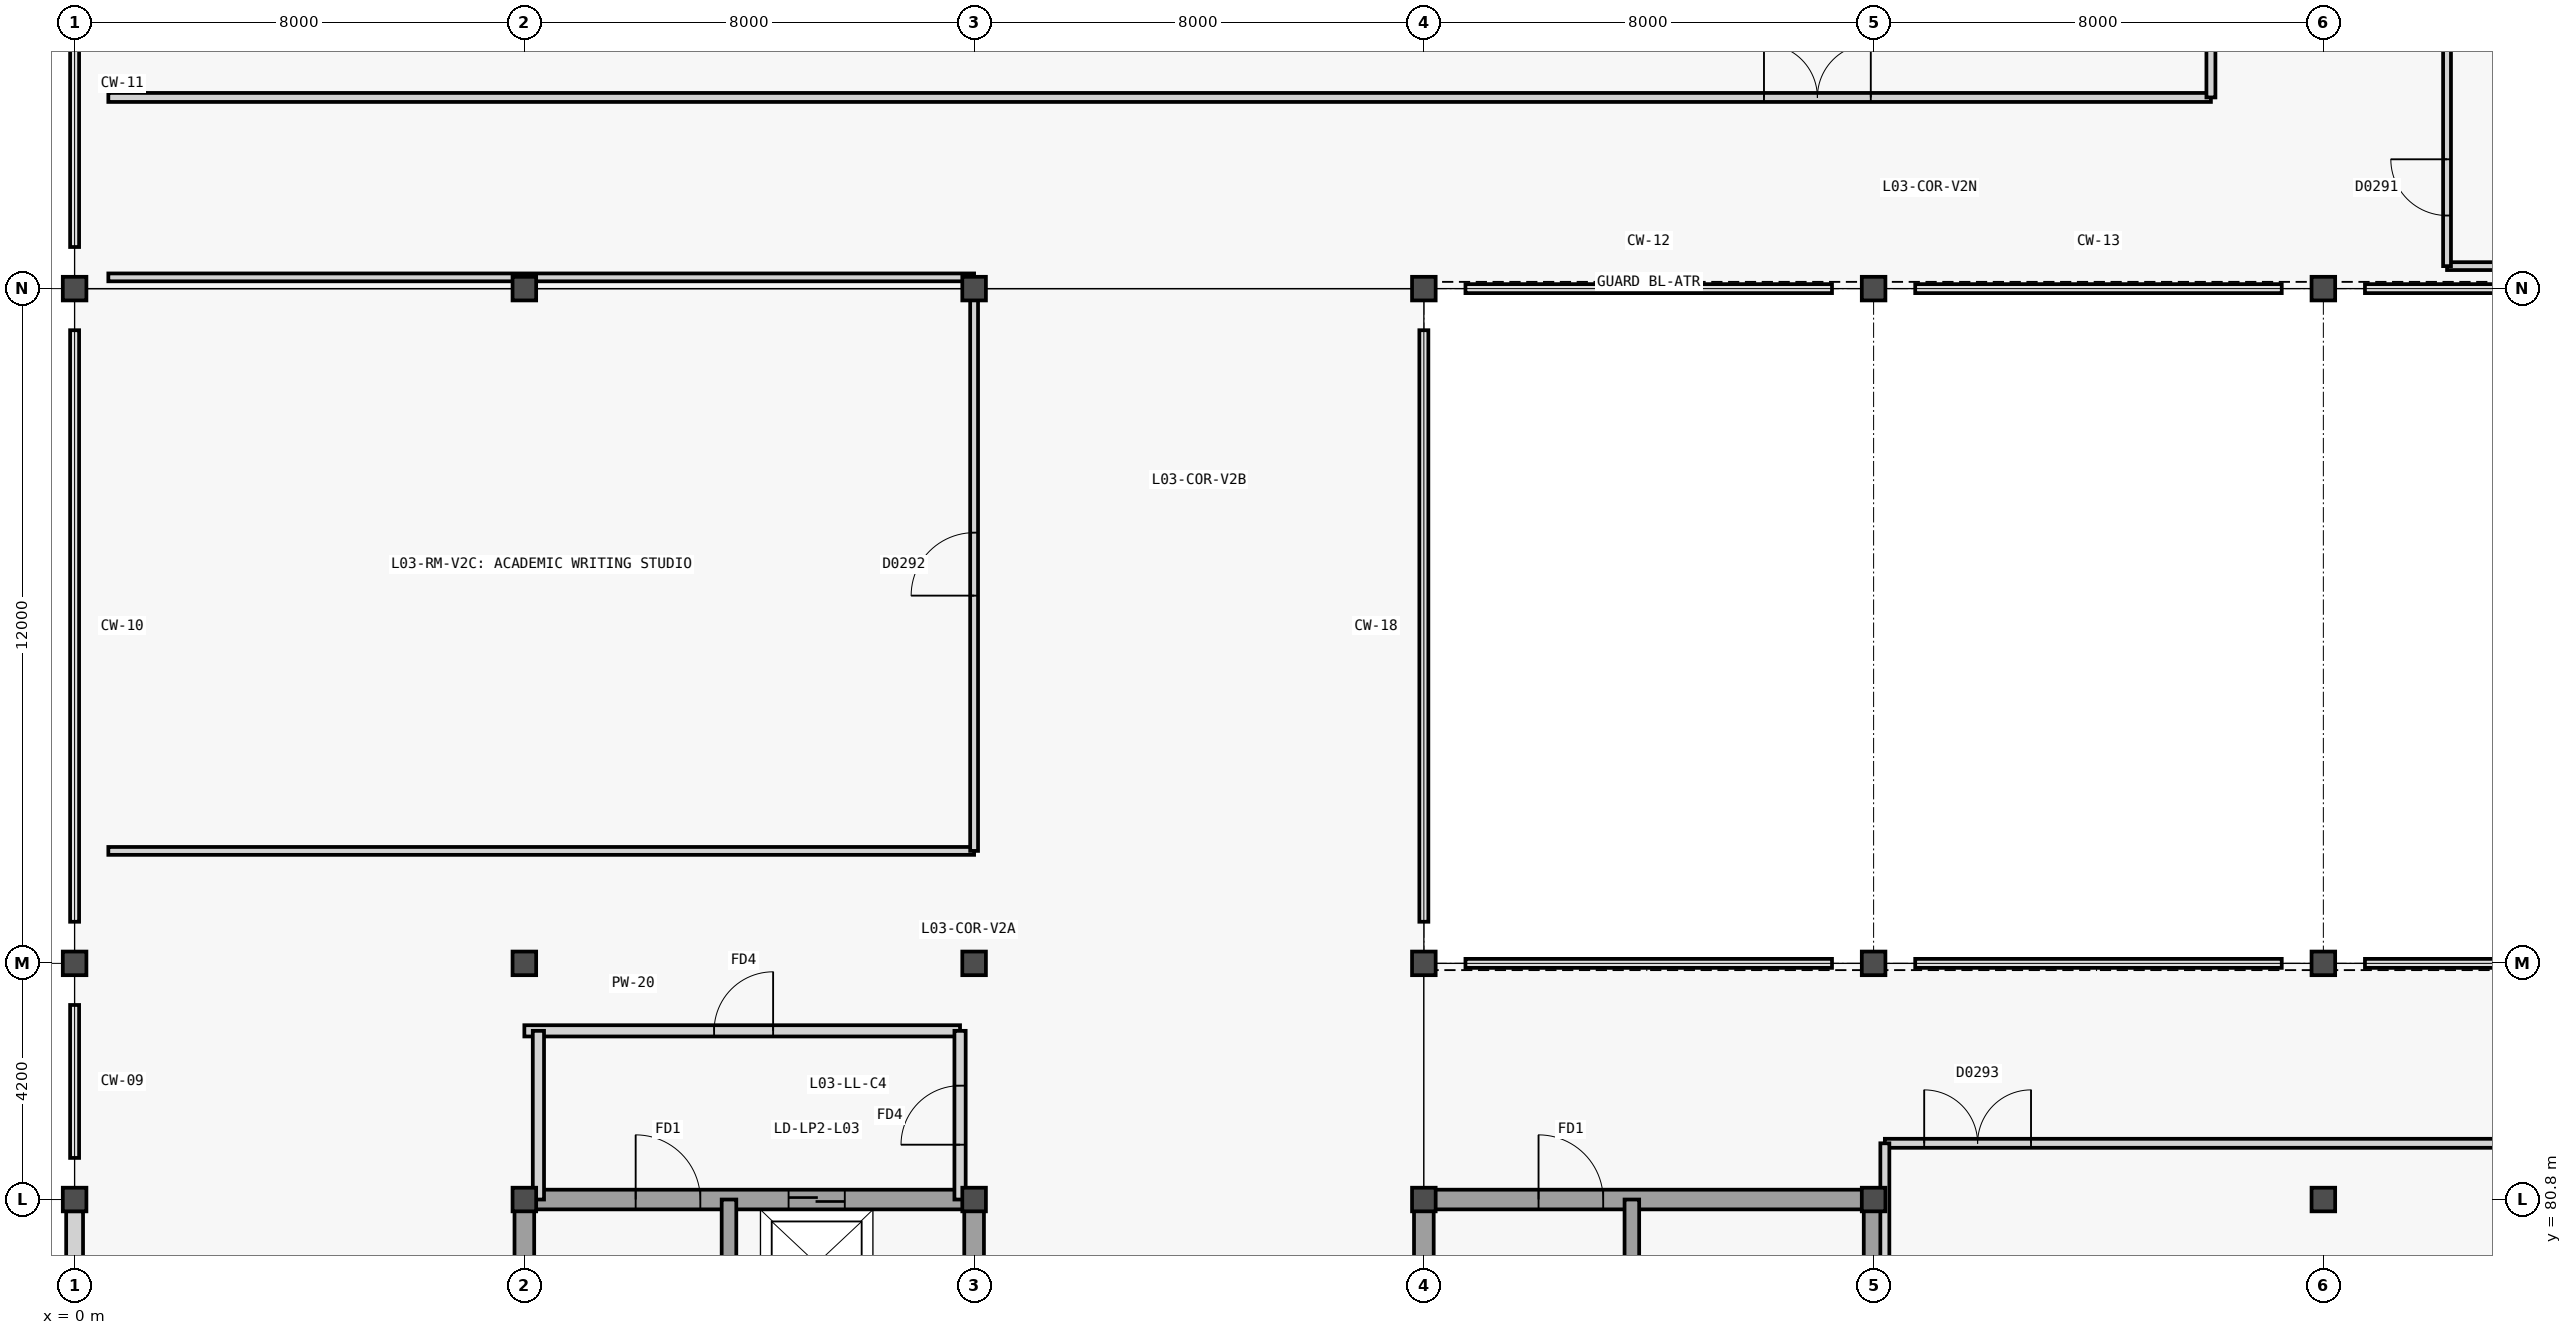
"""IFC4 building model, lengths in metres.
Left out: names, types, materials, properties, quantities, classifications, styles, units other than length and angle.
Written with IfcOpenShell. Run it as: python <this file> out.ifc"""

import sys

from ifc_helpers import new_model, si_unit, direction, frame, frame_2d, origin, origin_2d, place, context, subcontext, project, spatial, rectangle, extrude, element, fill, save


model = new_model("IFC4")
c1 = context("Model", 3, precision=1e-05, world=origin(), true_north=direction((0.0, 1.0)))
c2 = subcontext(c1, "Body", "Model", "MODEL_VIEW")
j1 = project(units=[si_unit("LENGTHUNIT", "METRE"), si_unit("PLANEANGLEUNIT", "RADIAN")], contexts=[c1])
p1 = place(None, origin())
s1 = spatial("IfcSite", under=j1, at=p1, CompositionType="ELEMENT")
p2 = place(p1, origin())
s2 = spatial("IfcBuilding", under=s1, at=p2, CompositionType="ELEMENT")
p3 = place(p2, frame((0.0, 0.0, 14.4)))
s3 = spatial("IfcBuildingStorey", under=s2, at=p3, CompositionType="ELEMENT", Elevation=14.4)
for number, where, z_axis, x_axis in (
    (1, (0.0, 80.8, 0.0), (0.0, 0.0, 1.0), (1.0, 0.0, 0.0)),
    (2, (0.0, 85.0, 0.0), (0.0, 0.0, 1.0), (1.0, 0.0, 0.0)),
    (3, (0.0, 97.0, 0.0), (0.0, 0.0, 1.0), (1.0, 0.0, 0.0)),
    (4, (8.0, 80.8, 0.0), (0.0, 0.0, 1.0), (1.0, 0.0, 0.0)),
    (5, (8.0, 85.0, 0.0), (0.0, 0.0, 1.0), (1.0, 0.0, 0.0)),
    (6, (8.0, 97.0, 0.0), (0.0, 0.0, 1.0), (1.0, 0.0, 0.0)),
    (7, (16.0, 80.8, 0.0), (0.0, 0.0, 1.0), (1.0, 0.0, 0.0)),
    (8, (16.0, 85.0, 0.0), (0.0, 0.0, 1.0), (1.0, 0.0, 0.0)),
    (9, (16.0, 97.0, 0.0), (0.0, 0.0, 1.0), (1.0, 0.0, 0.0)),
    (10, (24.0, 80.8, 0.0), (0.0, 0.0, 1.0), (1.0, 0.0, 0.0)),
    (11, (24.0, 85.0, 0.0), (0.0, 0.0, 1.0), (1.0, 0.0, 0.0)),
    (12, (24.0, 97.0, 0.0), (0.0, 0.0, 1.0), (1.0, 0.0, 0.0)),
):
    element("IfcColumn", number, at=place(p3, frame(where, z_axis=z_axis, x_axis=x_axis)), inside=s3, PredefinedType="COLUMN", context=c2, shape_type="SweptSolid", body=[
        extrude(rectangle(XDim=0.42, YDim=0.42, at=origin_2d()), origin(), (0.0, 0.0, 1.0), 3.34),
    ])
for number, where, z_axis, x_axis in (
    (13, (32.0, 80.8, 0.0), (0.0, 0.0, 1.0), (1.0, 0.0, 0.0)),
    (14, (32.0, 85.0, 0.0), (0.0, 0.0, 1.0), (1.0, 0.0, 0.0)),
):
    element("IfcColumn", number, at=place(p3, frame(where, z_axis=z_axis, x_axis=x_axis)), inside=s3, PredefinedType="COLUMN", context=c2, shape_type="SweptSolid", body=[
        extrude(rectangle(XDim=0.42, YDim=0.42, at=origin_2d()), origin(), (0.0, 0.0, 1.0), 3.6),
    ])
p4 = place(p3, frame((32.0, 97.0, 0.0), z_axis=(0.0, 0.0, 1.0), x_axis=(1.0, 0.0, 0.0)))
e15 = element("IfcColumn", 15, at=p4, inside=s3, PredefinedType="COLUMN", context=c2, shape_type="SweptSolid", body=[
    extrude(rectangle(XDim=0.42, YDim=0.42, at=origin_2d()), origin(), (0.0, 0.0, 1.0), 3.34),
])
for number, where, z_axis, x_axis in (
    (16, (40.0, 80.8, 0.0), (0.0, 0.0, 1.0), (1.0, 0.0, 0.0)),
    (17, (40.0, 85.0, 0.0), (0.0, 0.0, 1.0), (1.0, 0.0, 0.0)),
):
    element("IfcColumn", number, at=place(p3, frame(where, z_axis=z_axis, x_axis=x_axis)), inside=s3, PredefinedType="COLUMN", context=c2, shape_type="SweptSolid", body=[
        extrude(rectangle(XDim=0.42, YDim=0.42, at=origin_2d()), origin(), (0.0, 0.0, 1.0), 3.6),
    ])
p5 = place(p3, frame((40.0, 97.0, 0.0), z_axis=(0.0, 0.0, 1.0), x_axis=(1.0, 0.0, 0.0)))
e18 = element("IfcColumn", 18, at=p5, inside=s3, PredefinedType="COLUMN", context=c2, shape_type="SweptSolid", body=[
    extrude(rectangle(XDim=0.42, YDim=0.42, at=origin_2d()), origin(), (0.0, 0.0, 1.0), 3.34),
])
p6 = place(p3, frame((0.0, 72.608, 0.0), z_axis=(0.0, 0.0, 1.0), x_axis=(0.0, 1.0, 0.0)))
e19 = element("IfcWall", 19, at=p6, inside=s3, PredefinedType="SOLIDWALL", context=c2, shape_type="SweptSolid", body=[
    extrude(rectangle(XDim=7.984, YDim=0.3, at=frame_2d((3.992, 0.0))), origin(), (0.0, 0.0, 1.0), 2.74),
])
p7 = place(p6, frame((1.972, 0.0, 0.9)))
e20 = element("IfcOpeningElement", 20, at=p7, cuts=e19, PredefinedType="OPENING", context=c2, shape_type="SweptSolid", body=[
    extrude(rectangle(XDim=1.8, YDim=1.55, at=frame_2d((0.9, 0.775))), frame((0.0, 0.16, 0.0), z_axis=(0.0, -1.0, 0.0), x_axis=(1.0, 0.0, 0.0)), (0.0, 0.0, 1.0), 0.32),
])
for number, where, z_axis, x_axis in (
    (21, (8.0, 72.4, 0.0), (0.0, 0.0, 1.0), (0.0, 1.0, 0.0)),
    (22, (16.0, 72.4, 0.0), (0.0, 0.0, 1.0), (0.0, 1.0, 0.0)),
):
    element("IfcWall", number, at=place(p3, frame(where, z_axis=z_axis, x_axis=x_axis)), inside=s3, PredefinedType="SHEAR", context=c2, shape_type="SweptSolid", body=[
        extrude(rectangle(XDim=8.4, YDim=0.35, at=frame_2d((4.2, 0.0))), origin(), (0.0, 0.0, 1.0), 3.6),
    ])
p8 = place(p3, frame((8.0, 80.8, 0.0), z_axis=(0.0, 0.0, 1.0), x_axis=(1.0, 0.0, 0.0)))
e23 = element("IfcWall", 23, at=p8, inside=s3, PredefinedType="SHEAR", context=c2, shape_type="SweptSolid", body=[
    extrude(rectangle(XDim=8.0, YDim=0.35, at=frame_2d((4.0, 0.0))), origin(), (0.0, 0.0, 1.0), 3.6),
])
p9 = place(p8, frame((1.98, 0.0, 0.0)))
e24 = element("IfcOpeningElement", 24, at=p9, cuts=e23, PredefinedType="OPENING", context=c2, shape_type="SweptSolid", body=[
    extrude(rectangle(XDim=1.15, YDim=2.2, at=frame_2d((0.575, 1.1))), frame((0.0, 0.185, 0.0), z_axis=(0.0, -1.0, 0.0), x_axis=(1.0, 0.0, 0.0)), (0.0, 0.0, 1.0), 0.37),
])
p10 = place(p8, frame((4.7, 0.0, 0.0)))
e25 = element("IfcOpeningElement", 25, at=p10, cuts=e23, PredefinedType="OPENING", context=c2, shape_type="SweptSolid", body=[
    extrude(rectangle(XDim=1.0, YDim=2.15, at=frame_2d((0.5, 1.075))), frame((0.0, 0.185, 0.0), z_axis=(0.0, -1.0, 0.0), x_axis=(1.0, 0.0, 0.0)), (0.0, 0.0, 1.0), 0.37),
])
p11 = place(p3, frame((11.64, 72.4, 0.0), z_axis=(0.0, 0.0, 1.0), x_axis=(0.0, 1.0, 0.0)))
e26 = element("IfcWall", 26, at=p11, inside=s3, PredefinedType="SHEAR", context=c2, shape_type="SweptSolid", body=[
    extrude(rectangle(XDim=8.4, YDim=0.26, at=frame_2d((4.2, 0.0))), origin(), (0.0, 0.0, 1.0), 3.6),
])
p12 = place(p3, frame((8.0, 83.8, 0.0), z_axis=(0.0, 0.0, 1.0), x_axis=(1.0, 0.0, 0.0)))
e27 = element("IfcWall", 27, at=p12, inside=s3, PredefinedType="PARTITIONING", context=c2, shape_type="SweptSolid", body=[
    extrude(rectangle(XDim=7.75, YDim=0.2, at=frame_2d((3.875, 0.0))), origin(), (0.0, 0.0, 1.0), 3.32),
])
p13 = place(p12, frame((3.375, 0.0, 0.0)))
e28 = element("IfcOpeningElement", 28, at=p13, cuts=e27, PredefinedType="OPENING", context=c2, shape_type="SweptSolid", body=[
    extrude(rectangle(XDim=1.05, YDim=2.15, at=frame_2d((0.525, 1.075))), frame((0.0, 0.11, 0.0), z_axis=(0.0, -1.0, 0.0), x_axis=(1.0, 0.0, 0.0)), (0.0, 0.0, 1.0), 0.22),
])
p14 = place(p3, frame((15.75, 80.8, 0.0), z_axis=(0.0, 0.0, 1.0), x_axis=(0.0, 1.0, 0.0)))
e29 = element("IfcWall", 29, at=p14, inside=s3, PredefinedType="PARTITIONING", context=c2, shape_type="SweptSolid", body=[
    extrude(rectangle(XDim=3.0, YDim=0.2, at=frame_2d((1.5, 0.0))), origin(), (0.0, 0.0, 1.0), 2.74),
])
p15 = place(p14, frame((0.975, 0.0, 0.0)))
e30 = element("IfcOpeningElement", 30, at=p15, cuts=e29, PredefinedType="OPENING", context=c2, shape_type="SweptSolid", body=[
    extrude(rectangle(XDim=1.05, YDim=2.15, at=frame_2d((0.525, 1.075))), frame((0.0, 0.11, 0.0), z_axis=(0.0, -1.0, 0.0), x_axis=(1.0, 0.0, 0.0)), (0.0, 0.0, 1.0), 0.22),
])
p16 = place(p3, frame((8.25, 80.8, 0.0), z_axis=(0.0, 0.0, 1.0), x_axis=(0.0, 1.0, 0.0)))
e31 = element("IfcWall", 31, at=p16, inside=s3, PredefinedType="PARTITIONING", context=c2, shape_type="SweptSolid", body=[
    extrude(rectangle(XDim=3.0, YDim=0.2, at=frame_2d((1.5, 0.0))), origin(), (0.0, 0.0, 1.0), 2.74),
])
for number, where, z_axis, x_axis in (
    (32, (24.0, 72.4, 0.0), (0.0, 0.0, 1.0), (0.0, 1.0, 0.0)),
    (33, (32.0, 72.4, 0.0), (0.0, 0.0, 1.0), (0.0, 1.0, 0.0)),
):
    element("IfcWall", number, at=place(p3, frame(where, z_axis=z_axis, x_axis=x_axis)), inside=s3, PredefinedType="SHEAR", context=c2, shape_type="SweptSolid", body=[
        extrude(rectangle(XDim=8.4, YDim=0.35, at=frame_2d((4.2, 0.0))), origin(), (0.0, 0.0, 1.0), 3.34),
    ])
p17 = place(p3, frame((24.0, 80.8, 0.0), z_axis=(0.0, 0.0, 1.0), x_axis=(1.0, 0.0, 0.0)))
e34 = element("IfcWall", 34, at=p17, inside=s3, PredefinedType="SHEAR", context=c2, shape_type="SweptSolid", body=[
    extrude(rectangle(XDim=8.0, YDim=0.35, at=frame_2d((4.0, 0.0))), origin(), (0.0, 0.0, 1.0), 3.34),
])
p18 = place(p17, frame((2.04, 0.0, 0.0)))
e35 = element("IfcOpeningElement", 35, at=p18, cuts=e34, PredefinedType="OPENING", context=c2, shape_type="SweptSolid", body=[
    extrude(rectangle(XDim=1.15, YDim=2.2, at=frame_2d((0.575, 1.1))), frame((0.0, 0.185, 0.0), z_axis=(0.0, -1.0, 0.0), x_axis=(1.0, 0.0, 0.0)), (0.0, 0.0, 1.0), 0.37),
])
p19 = place(p3, frame((27.7, 72.4, 0.0), z_axis=(0.0, 0.0, 1.0), x_axis=(0.0, 1.0, 0.0)))
e36 = element("IfcWall", 36, at=p19, inside=s3, PredefinedType="SHEAR", context=c2, shape_type="SweptSolid", body=[
    extrude(rectangle(XDim=8.4, YDim=0.26, at=frame_2d((4.2, 0.0))), origin(), (0.0, 0.0, 1.0), 3.34),
])
p20 = place(p3, frame((0.6, 100.4, 0.0), z_axis=(0.0, 0.0, 1.0), x_axis=(1.0, 0.0, 0.0)))
e37 = element("IfcWall", 37, at=p20, inside=s3, PredefinedType="PARTITIONING", context=c2, shape_type="SweptSolid", body=[
    extrude(rectangle(XDim=37.4, YDim=0.16, at=frame_2d((18.7, 0.0))), origin(), (0.0, 0.0, 1.0), 3.34),
])
p21 = place(p20, frame((29.45, 0.0, 0.0)))
e38 = element("IfcOpeningElement", 38, at=p21, cuts=e37, PredefinedType="OPENING", context=c2, shape_type="SweptSolid", body=[
    extrude(rectangle(XDim=1.9, YDim=2.3, at=frame_2d((0.95, 1.15))), frame((0.0, 0.09, 0.0), z_axis=(0.0, -1.0, 0.0), x_axis=(1.0, 0.0, 0.0)), (0.0, 0.0, 1.0), 0.18),
])
p22 = place(p3, frame((38.0, 100.4, 0.0), z_axis=(0.0, 0.0, 1.0), x_axis=(0.0, 1.0, 0.0)))
e39 = element("IfcWall", 39, at=p22, inside=s3, PredefinedType="PARTITIONING", context=c2, shape_type="SweptSolid", body=[
    extrude(rectangle(XDim=9.8, YDim=0.16, at=frame_2d((4.9, 0.0))), origin(), (0.0, 0.0, 1.0), 3.34),
])
p23 = place(p3, frame((42.2, 97.4, 0.0), z_axis=(0.0, 0.0, 1.0), x_axis=(1.0, 0.0, 0.0)))
e40 = element("IfcWall", 40, at=p23, inside=s3, PredefinedType="PARTITIONING", context=c2, shape_type="SweptSolid", body=[
    extrude(rectangle(XDim=29.6, YDim=0.14, at=frame_2d((14.8, 0.0))), origin(), (0.0, 0.0, 1.0), 2.66),
])
p24 = place(p3, frame((42.2, 97.4, 0.0), z_axis=(0.0, 0.0, 1.0), x_axis=(0.0, 1.0, 0.0)))
e41 = element("IfcWall", 41, at=p24, inside=s3, PredefinedType="PARTITIONING", context=c2, shape_type="SweptSolid", body=[
    extrude(rectangle(XDim=12.8, YDim=0.14, at=frame_2d((6.4, 0.0))), origin(), (0.0, 0.0, 1.0), 3.34),
])
p25 = place(p24, frame((0.9, 0.0, 0.0)))
e42 = element("IfcOpeningElement", 42, at=p25, cuts=e41, PredefinedType="OPENING", context=c2, shape_type="SweptSolid", body=[
    extrude(rectangle(XDim=1.0, YDim=2.15, at=frame_2d((0.5, 1.075))), frame((0.0, 0.08, 0.0), z_axis=(0.0, -1.0, 0.0), x_axis=(1.0, 0.0, 0.0)), (0.0, 0.0, 1.0), 0.16),
])
p26 = place(p3, frame((0.6, 87.0, 0.0), z_axis=(0.0, 0.0, 1.0), x_axis=(1.0, 0.0, 0.0)))
e43 = element("IfcWall", 43, at=p26, inside=s3, PredefinedType="PARTITIONING", context=c2, shape_type="SweptSolid", body=[
    extrude(rectangle(XDim=15.4, YDim=0.14, at=frame_2d((7.7, 0.0))), origin(), (0.0, 0.0, 1.0), 3.34),
])
p27 = place(p3, frame((0.6, 97.2, 0.0), z_axis=(0.0, 0.0, 1.0), x_axis=(1.0, 0.0, 0.0)))
e44 = element("IfcWall", 44, at=p27, inside=s3, PredefinedType="PARTITIONING", context=c2, shape_type="SweptSolid", body=[
    extrude(rectangle(XDim=15.4, YDim=0.14, at=frame_2d((7.7, 0.0))), origin(), (0.0, 0.0, 1.0), 2.66),
])
p28 = place(p3, frame((16.0, 87.0, 0.0), z_axis=(0.0, 0.0, 1.0), x_axis=(0.0, 1.0, 0.0)))
e45 = element("IfcWall", 45, at=p28, inside=s3, PredefinedType="PARTITIONING", context=c2, shape_type="SweptSolid", body=[
    extrude(rectangle(XDim=10.2, YDim=0.14, at=frame_2d((5.1, 0.0))), origin(), (0.0, 0.0, 1.0), 2.69),
])
p29 = place(p28, frame((4.54, 0.0, 0.0)))
e46 = element("IfcOpeningElement", 46, at=p29, cuts=e45, PredefinedType="OPENING", context=c2, shape_type="SweptSolid", body=[
    extrude(rectangle(XDim=1.12, YDim=2.15, at=frame_2d((0.56, 1.075))), frame((0.0, 0.08, 0.0), z_axis=(0.0, -1.0, 0.0), x_axis=(1.0, 0.0, 0.0)), (0.0, 0.0, 1.0), 0.16),
])
p30 = place(p3, frame((32.2, 81.8, 0.0), z_axis=(0.0, 0.0, 1.0), x_axis=(1.0, 0.0, 0.0)))
e47 = element("IfcWall", 47, at=p30, inside=s3, PredefinedType="PARTITIONING", context=c2, shape_type="SweptSolid", body=[
    extrude(rectangle(XDim=15.6, YDim=0.16, at=frame_2d((7.8, 0.0))), origin(), (0.0, 0.0, 1.0), 3.34),
])
p31 = place(p30, frame((0.7, 0.0, 0.0)))
e48 = element("IfcOpeningElement", 48, at=p31, cuts=e47, PredefinedType="OPENING", context=c2, shape_type="SweptSolid", body=[
    extrude(rectangle(XDim=1.9, YDim=2.3, at=frame_2d((0.95, 1.15))), frame((0.0, 0.09, 0.0), z_axis=(0.0, -1.0, 0.0), x_axis=(1.0, 0.0, 0.0)), (0.0, 0.0, 1.0), 0.18),
])
p32 = place(p3, frame((32.2, 65.5, 0.0), z_axis=(0.0, 0.0, 1.0), x_axis=(0.0, 1.0, 0.0)))
e49 = element("IfcWall", 49, at=p32, inside=s3, PredefinedType="PARTITIONING", context=c2, shape_type="SweptSolid", body=[
    extrude(rectangle(XDim=16.3, YDim=0.16, at=frame_2d((8.15, 0.0))), origin(), (0.0, 0.0, 1.0), 2.74),
])
p33 = place(p9, origin())
e50 = element("IfcDoor", 50, at=p33, inside=s3, OperationType="SINGLE_SWING_LEFT", PredefinedType="DOOR", context=c2, shape_type="SweptSolid", body=[
    extrude(rectangle(XDim=1.15, YDim=2.2, at=frame_2d((0.575, 1.1))), frame((0.0, 0.025, 0.0), z_axis=(0.0, -1.0, 0.0), x_axis=(1.0, 0.0, 0.0)), (0.0, 0.0, 1.0), 0.05),
])
fill(e24, e50)
p34 = place(p10, origin())
e51 = element("IfcDoor", 51, at=p34, inside=s3, OperationType="DOUBLE_DOOR_SLIDING", PredefinedType="DOOR", context=c2, shape_type="SweptSolid", body=[
    extrude(rectangle(XDim=1.0, YDim=2.15, at=frame_2d((0.5, 1.075))), frame((0.0, 0.025, 0.0), z_axis=(0.0, -1.0, 0.0), x_axis=(1.0, 0.0, 0.0)), (0.0, 0.0, 1.0), 0.05),
])
fill(e25, e51)
p35 = place(p13, origin())
e52 = element("IfcDoor", 52, at=p35, inside=s3, OperationType="SINGLE_SWING_RIGHT", PredefinedType="DOOR", context=c2, shape_type="SweptSolid", body=[
    extrude(rectangle(XDim=1.05, YDim=2.15, at=frame_2d((0.525, 1.075))), frame((0.0, 0.025, 0.0), z_axis=(0.0, -1.0, 0.0), x_axis=(1.0, 0.0, 0.0)), (0.0, 0.0, 1.0), 0.05),
])
fill(e28, e52)
p36 = place(p15, origin())
e53 = element("IfcDoor", 53, at=p36, inside=s3, OperationType="SINGLE_SWING_LEFT", PredefinedType="DOOR", context=c2, shape_type="SweptSolid", body=[
    extrude(rectangle(XDim=1.05, YDim=2.15, at=frame_2d((0.525, 1.075))), frame((0.0, 0.025, 0.0), z_axis=(0.0, -1.0, 0.0), x_axis=(1.0, 0.0, 0.0)), (0.0, 0.0, 1.0), 0.05),
])
fill(e30, e53)
p37 = place(p18, origin())
e54 = element("IfcDoor", 54, at=p37, inside=s3, OperationType="SINGLE_SWING_LEFT", PredefinedType="DOOR", context=c2, shape_type="SweptSolid", body=[
    extrude(rectangle(XDim=1.15, YDim=2.2, at=frame_2d((0.575, 1.1))), frame((0.0, 0.025, 0.0), z_axis=(0.0, -1.0, 0.0), x_axis=(1.0, 0.0, 0.0)), (0.0, 0.0, 1.0), 0.05),
])
fill(e35, e54)
p38 = place(p21, origin())
e55 = element("IfcDoor", 55, at=p38, inside=s3, OperationType="DOUBLE_DOOR_SINGLE_SWING", PredefinedType="DOOR", context=c2, shape_type="SweptSolid", body=[
    extrude(rectangle(XDim=1.9, YDim=2.3, at=frame_2d((0.95, 1.15))), frame((0.0, 0.025, 0.0), z_axis=(0.0, -1.0, 0.0), x_axis=(1.0, 0.0, 0.0)), (0.0, 0.0, 1.0), 0.05),
])
fill(e38, e55)
p39 = place(p25, origin())
e56 = element("IfcDoor", 56, at=p39, inside=s3, OperationType="SINGLE_SWING_RIGHT", PredefinedType="DOOR", context=c2, shape_type="SweptSolid", body=[
    extrude(rectangle(XDim=1.0, YDim=2.15, at=frame_2d((0.5, 1.075))), frame((0.0, 0.025, 0.0), z_axis=(0.0, -1.0, 0.0), x_axis=(1.0, 0.0, 0.0)), (0.0, 0.0, 1.0), 0.05),
])
fill(e42, e56)
p40 = place(p29, origin())
e57 = element("IfcDoor", 57, at=p40, inside=s3, OperationType="SINGLE_SWING_LEFT", PredefinedType="DOOR", context=c2, shape_type="SweptSolid", body=[
    extrude(rectangle(XDim=1.12, YDim=2.15, at=frame_2d((0.56, 1.075))), frame((0.0, 0.025, 0.0), z_axis=(0.0, -1.0, 0.0), x_axis=(1.0, 0.0, 0.0)), (0.0, 0.0, 1.0), 0.05),
])
fill(e46, e57)
p41 = place(p31, origin())
e58 = element("IfcDoor", 58, at=p41, inside=s3, OperationType="DOUBLE_DOOR_SINGLE_SWING", PredefinedType="DOOR", context=c2, shape_type="SweptSolid", body=[
    extrude(rectangle(XDim=1.9, YDim=2.3, at=frame_2d((0.95, 1.15))), frame((0.0, 0.025, 0.0), z_axis=(0.0, -1.0, 0.0), x_axis=(1.0, 0.0, 0.0)), (0.0, 0.0, 1.0), 0.05),
])
fill(e48, e58)
save(model, sys.argv[1])
